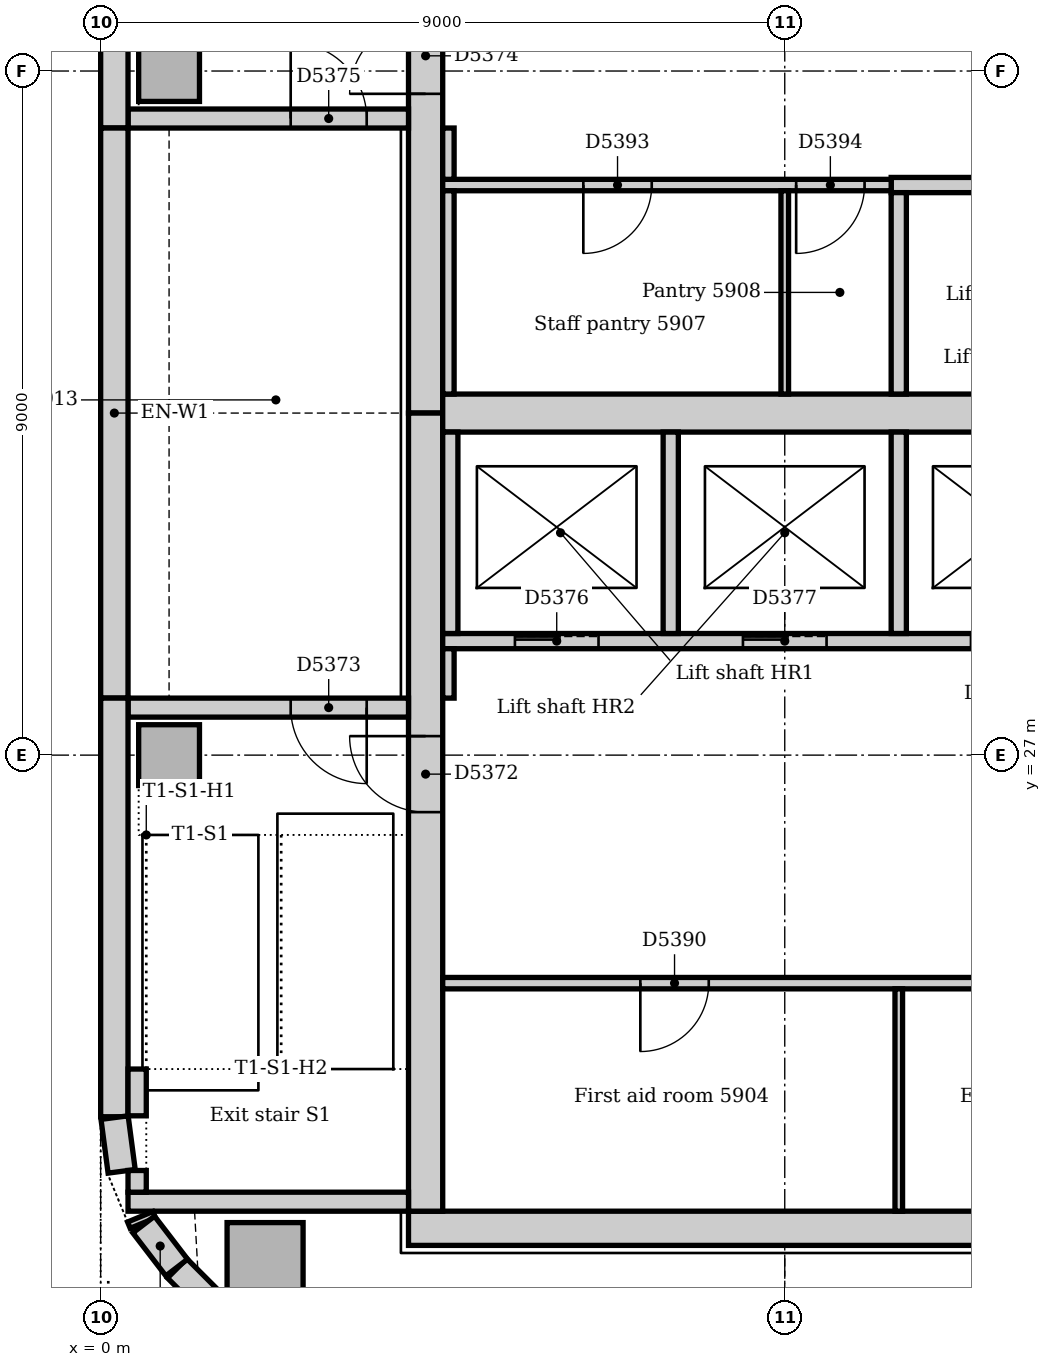
"""IFC4 building model, lengths in metres.
Left out: names, types, materials, properties, quantities, classifications, styles, units other than length and angle.
Written with IfcOpenShell. Run it as: python <this file> out.ifc"""

import sys

from ifc_helpers import new_model, si_unit, direction, frame, frame_2d, origin, origin_2d, place, context, subcontext, project, spatial, rectangle, extrude, element, fill, save


model = new_model("IFC4")
c1 = context("Model", 3, precision=1e-05, world=origin(), true_north=direction((0.0, 1.0)))
c2 = subcontext(c1, "Body", "Model", "MODEL_VIEW")
j1 = project(units=[si_unit("LENGTHUNIT", "METRE"), si_unit("PLANEANGLEUNIT", "RADIAN")], contexts=[c1])
p1 = place(None, origin())
s1 = spatial("IfcSite", under=j1, at=p1, CompositionType="ELEMENT")
p2 = place(p1, origin())
s2 = spatial("IfcBuilding", under=s1, at=p2, CompositionType="ELEMENT")
p3 = place(p2, frame((0.0, 0.0, 247.0)))
s3 = spatial("IfcBuildingStorey", under=s2, at=p3, CompositionType="ELEMENT", Elevation=247.0)
p4 = place(p3, frame((4.05, 20.775, 0.0), z_axis=(0.0, 0.0, 1.0), x_axis=(1.0, 0.0, 0.0)))
e1 = element("IfcWall", 1, at=p4, inside=s3, PredefinedType="SOLIDWALL", context=c2, shape_type="SweptSolid", body=[
    extrude(rectangle(XDim=18.9, YDim=0.45, at=frame_2d((9.45, 0.0))), origin(), (0.0, 0.0, 1.0), 4.0),
])
p5 = place(p3, frame((4.275, 42.0, 0.0), z_axis=(0.0, 0.0, 1.0), x_axis=(0.0, -1.0, 0.0)))
e2 = element("IfcWall", 2, at=p5, inside=s3, PredefinedType="SOLIDWALL", context=c2, shape_type="SweptSolid", body=[
    extrude(rectangle(XDim=10.5, YDim=0.45, at=frame_2d((5.25, 0.0))), origin(), (0.0, 0.0, 1.0), 4.0),
])
p6 = place(p5, frame((5.3, 0.0, 0.0)))
e3 = element("IfcOpeningElement", 3, at=p6, cuts=e2, PredefinedType="OPENING", context=c2, shape_type="SweptSolid", body=[
    extrude(rectangle(XDim=1.0, YDim=2.1, at=frame_2d((0.5, 1.05))), frame((0.0, 0.235, 0.0), z_axis=(0.0, -1.0, 0.0), x_axis=(1.0, 0.0, 0.0)), (0.0, 0.0, 1.0), 0.47),
])
p7 = place(p3, frame((4.275, 31.5, 0.0), z_axis=(0.0, 0.0, 1.0), x_axis=(0.0, -1.0, 0.0)))
e4 = element("IfcWall", 4, at=p7, inside=s3, PredefinedType="SOLIDWALL", context=c2, shape_type="SweptSolid", body=[
    extrude(rectangle(XDim=10.5, YDim=0.45, at=frame_2d((5.25, 0.0))), origin(), (0.0, 0.0, 1.0), 4.0),
])
p8 = place(p7, frame((4.25, 0.0, 0.0)))
e5 = element("IfcOpeningElement", 5, at=p8, cuts=e4, PredefinedType="OPENING", context=c2, shape_type="SweptSolid", body=[
    extrude(rectangle(XDim=1.0, YDim=2.1, at=frame_2d((0.5, 1.05))), frame((0.0, 0.235, 0.0), z_axis=(0.0, -1.0, 0.0), x_axis=(1.0, 0.0, 0.0)), (0.0, 0.0, 1.0), 0.47),
])
p9 = place(p3, frame((4.5, 31.5, 0.0), z_axis=(0.0, 0.0, 1.0), x_axis=(1.0, 0.0, 0.0)))
e6 = element("IfcWall", 6, at=p9, inside=s3, PredefinedType="SOLIDWALL", context=c2, shape_type="SweptSolid", body=[
    extrude(rectangle(XDim=18.0, YDim=0.5, at=frame_2d((9.0, 0.0))), origin(), (0.0, 0.0, 1.0), 4.0),
])
p10 = place(p3, frame((0.36, 21.125, 0.0), z_axis=(0.0, 0.0, 1.0), x_axis=(1.0, 0.0, 0.0)))
e7 = element("IfcWall", 7, at=p10, inside=s3, PredefinedType="SOLIDWALL", context=c2, shape_type="SweptSolid", body=[
    extrude(rectangle(XDim=3.69, YDim=0.25, at=frame_2d((1.845, 0.0))), origin(), (0.0, 0.0, 1.0), 4.0),
])
p11 = place(p3, frame((4.05, 27.625, 0.0), z_axis=(0.0, 0.0, 1.0), x_axis=(-1.0, 0.0, 0.0)))
e8 = element("IfcWall", 8, at=p11, inside=s3, PredefinedType="SOLIDWALL", context=c2, shape_type="SweptSolid", body=[
    extrude(rectangle(XDim=3.69, YDim=0.25, at=frame_2d((1.845, 0.0))), origin(), (0.0, 0.0, 1.0), 4.0),
])
p12 = place(p11, frame((0.55, 0.0, 0.0)))
e9 = element("IfcOpeningElement", 9, at=p12, cuts=e8, PredefinedType="OPENING", context=c2, shape_type="SweptSolid", body=[
    extrude(rectangle(XDim=1.0, YDim=2.1, at=frame_2d((0.5, 1.05))), frame((0.0, 0.135, 0.0), z_axis=(0.0, -1.0, 0.0), x_axis=(1.0, 0.0, 0.0)), (0.0, 0.0, 1.0), 0.27),
])
p13 = place(p3, frame((0.36, 35.375, 0.0), z_axis=(0.0, 0.0, 1.0), x_axis=(1.0, 0.0, 0.0)))
e10 = element("IfcWall", 10, at=p13, inside=s3, PredefinedType="SOLIDWALL", context=c2, shape_type="SweptSolid", body=[
    extrude(rectangle(XDim=3.69, YDim=0.25, at=frame_2d((1.845, 0.0))), origin(), (0.0, 0.0, 1.0), 4.0),
])
p14 = place(p13, frame((2.14, 0.0, 0.0)))
e11 = element("IfcOpeningElement", 11, at=p14, cuts=e10, PredefinedType="OPENING", context=c2, shape_type="SweptSolid", body=[
    extrude(rectangle(XDim=1.0, YDim=2.1, at=frame_2d((0.5, 1.05))), frame((0.0, 0.135, 0.0), z_axis=(0.0, -1.0, 0.0), x_axis=(1.0, 0.0, 0.0)), (0.0, 0.0, 1.0), 0.27),
])
p15 = place(p3, frame((2.163, 20.35, -0.15), z_axis=(0.0, 0.0, 1.0), x_axis=(1.0, 0.0, 0.0)))
e12 = element("IfcColumn", 12, at=p15, inside=s3, PredefinedType="COLUMN", context=c2, shape_type="SweptSolid", body=[
    extrude(rectangle(XDim=1.0, YDim=1.0, at=origin_2d()), origin(), (0.0, 0.0, 1.0), 4.0),
])
for number, where, z_axis, x_axis in (
    (13, (0.9, 27.0, 0.0), (0.0, 0.0, 1.0), (1.0, 0.0, 0.0)),
    (14, (0.9, 36.0, 0.0), (0.0, 0.0, 1.0), (1.0, 0.0, 0.0)),
):
    element("IfcColumn", number, at=place(p3, frame(where, z_axis=z_axis, x_axis=x_axis)), inside=s3, PredefinedType="COLUMN", context=c2, shape_type="SweptSolid", body=[
        extrude(rectangle(XDim=0.8, YDim=0.8, at=origin_2d()), origin(), (0.0, 0.0, 1.0), 4.0),
    ])
p16 = place(p3, frame((0.18, 42.0, 0.0), z_axis=(0.0, 0.0, 1.0), x_axis=(0.0, -1.0, 0.0)))
e15 = element("IfcWall", 15, at=p16, inside=s3, PredefinedType="STANDARD", context=c2, shape_type="SweptSolid", body=[
    extrude(rectangle(XDim=6.75, YDim=0.36, at=frame_2d((3.375, 0.0))), origin(), (0.0, 0.0, 1.0), 3.85),
])
p17 = place(p3, frame((0.18, 35.25, 0.0), z_axis=(0.0, 0.0, 1.0), x_axis=(0.0, -1.0, 0.0)))
e16 = element("IfcWall", 16, at=p17, inside=s3, PredefinedType="STANDARD", context=c2, shape_type="SweptSolid", body=[
    extrude(rectangle(XDim=7.5, YDim=0.36, at=frame_2d((3.75, 0.0))), origin(), (0.0, 0.0, 1.0), 3.85),
])
p18 = place(p3, frame((0.18, 27.75, 0.0), z_axis=(0.0, 0.0, 1.0), x_axis=(0.0, -1.0, 0.0)))
e17 = element("IfcWall", 17, at=p18, inside=s3, PredefinedType="STANDARD", context=c2, shape_type="SweptSolid", body=[
    extrude(rectangle(XDim=5.507, YDim=0.36, at=frame_2d((2.754, 0.0))), origin(), (0.0, 0.0, 1.0), 3.85),
])
p19 = place(p3, frame((1.006, 20.249, 0.0), z_axis=(0.0, 0.0, 1.0), x_axis=(0.707106781187, -0.707106781187, 0.0)))
e18 = element("IfcWall", 18, at=p19, inside=s3, PredefinedType="STANDARD", context=c2, shape_type="SweptSolid", body=[
    extrude(rectangle(XDim=1.757, YDim=0.36, at=frame_2d((0.879, 0.0))), origin(), (0.0, 0.0, 1.0), 3.85),
])
p20 = place(p3, frame((0.183, 22.231, 0.0), z_axis=(0.0, 0.0, 1.0), x_axis=(0.13055608231, -0.99144092581, 0.0)))
e19 = element("IfcWall", 19, at=p20, inside=s3, PredefinedType="STANDARD", context=c2, shape_type="SweptSolid", body=[
    extrude(rectangle(XDim=0.713, YDim=0.36, at=frame_2d((0.356, 0.0))), origin(), (0.0, 0.0, 1.0), 3.85),
])
p21 = place(p3, frame((0.521, 20.927, 0.0), z_axis=(0.0, 0.0, 1.0), x_axis=(0.382549378284, -0.923935048136, 0.0)))
e20 = element("IfcWall", 20, at=p21, inside=s3, PredefinedType="STANDARD", context=c2, shape_type="SweptSolid", body=[
    extrude(rectangle(XDim=0.089, YDim=0.36, at=frame_2d((0.045, 0.0))), origin(), (0.0, 0.0, 1.0), 3.85),
])
p22 = place(p3, frame((0.566, 20.825, 0.0), z_axis=(0.0, 0.0, 1.0), x_axis=(0.608802368033, -0.793321924995, 0.0)))
e21 = element("IfcWall", 21, at=p22, inside=s3, PredefinedType="STANDARD", context=c2, shape_type="SweptSolid", body=[
    extrude(rectangle(XDim=0.713, YDim=0.36, at=frame_2d((0.357, 0.0))), origin(), (0.0, 0.0, 1.0), 3.85),
])
p23 = place(p3, frame((0.48, 21.25, 0.0), z_axis=(0.0, 0.0, 1.0), x_axis=(0.0, 1.0, 0.0)))
e22 = element("IfcWall", 22, at=p23, inside=s3, PredefinedType="STANDARD", context=c2, shape_type="SweptSolid", body=[
    extrude(rectangle(XDim=0.285, YDim=0.24, at=frame_2d((0.143, 0.0))), origin(), (0.0, 0.0, 1.0), 4.0),
])
p24 = place(p3, frame((0.48, 22.255, 0.0), z_axis=(0.0, 0.0, 1.0), x_axis=(0.0, 1.0, 0.0)))
e23 = element("IfcWall", 23, at=p24, inside=s3, PredefinedType="STANDARD", context=c2, shape_type="SweptSolid", body=[
    extrude(rectangle(XDim=0.615, YDim=0.24, at=frame_2d((0.307, 0.0))), origin(), (0.0, 0.0, 1.0), 4.0),
])
p25 = place(p3, frame((4.5, 28.5, 0.0), z_axis=(0.0, 0.0, 1.0), x_axis=(1.0, 0.0, 0.0)))
e24 = element("IfcWall", 24, at=p25, inside=s3, PredefinedType="PARTITIONING", context=c2, shape_type="SweptSolid", body=[
    extrude(rectangle(XDim=18.0, YDim=0.2, at=frame_2d((9.0, 0.0))), origin(), (0.0, 0.0, 1.0), 3.85),
])
p26 = place(p25, frame((0.95, 0.0, 0.0)))
e25 = element("IfcOpeningElement", 25, at=p26, cuts=e24, PredefinedType="OPENING", context=c2, shape_type="SweptSolid", body=[
    extrude(rectangle(XDim=1.1, YDim=2.1, at=frame_2d((0.55, 1.05))), frame((0.0, 0.11, 0.0), z_axis=(0.0, -1.0, 0.0), x_axis=(1.0, 0.0, 0.0)), (0.0, 0.0, 1.0), 0.22),
])
p27 = place(p25, frame((3.95, 0.0, 0.0)))
e26 = element("IfcOpeningElement", 26, at=p27, cuts=e24, PredefinedType="OPENING", context=c2, shape_type="SweptSolid", body=[
    extrude(rectangle(XDim=1.1, YDim=2.1, at=frame_2d((0.55, 1.05))), frame((0.0, 0.11, 0.0), z_axis=(0.0, -1.0, 0.0), x_axis=(1.0, 0.0, 0.0)), (0.0, 0.0, 1.0), 0.22),
])
p28 = place(p25, frame((6.95, 0.0, 0.0)))
e27 = element("IfcOpeningElement", 27, at=p28, cuts=e24, PredefinedType="OPENING", context=c2, shape_type="SweptSolid", body=[
    extrude(rectangle(XDim=1.1, YDim=2.1, at=frame_2d((0.55, 1.05))), frame((0.0, 0.11, 0.0), z_axis=(0.0, -1.0, 0.0), x_axis=(1.0, 0.0, 0.0)), (0.0, 0.0, 1.0), 0.22),
])
p29 = place(p25, frame((9.95, 0.0, 0.0)))
e28 = element("IfcOpeningElement", 28, at=p29, cuts=e24, PredefinedType="OPENING", context=c2, shape_type="SweptSolid", body=[
    extrude(rectangle(XDim=1.1, YDim=2.1, at=frame_2d((0.55, 1.05))), frame((0.0, 0.11, 0.0), z_axis=(0.0, -1.0, 0.0), x_axis=(1.0, 0.0, 0.0)), (0.0, 0.0, 1.0), 0.22),
])
p30 = place(p25, frame((12.95, 0.0, 0.0)))
e29 = element("IfcOpeningElement", 29, at=p30, cuts=e24, PredefinedType="OPENING", context=c2, shape_type="SweptSolid", body=[
    extrude(rectangle(XDim=1.1, YDim=2.1, at=frame_2d((0.55, 1.05))), frame((0.0, 0.11, 0.0), z_axis=(0.0, -1.0, 0.0), x_axis=(1.0, 0.0, 0.0)), (0.0, 0.0, 1.0), 0.22),
])
p31 = place(p25, frame((15.95, 0.0, 0.0)))
e30 = element("IfcOpeningElement", 30, at=p31, cuts=e24, PredefinedType="OPENING", context=c2, shape_type="SweptSolid", body=[
    extrude(rectangle(XDim=1.1, YDim=2.1, at=frame_2d((0.55, 1.05))), frame((0.0, 0.11, 0.0), z_axis=(0.0, -1.0, 0.0), x_axis=(1.0, 0.0, 0.0)), (0.0, 0.0, 1.0), 0.22),
])
p32 = place(p3, frame((10.4, 34.5, 0.0), z_axis=(0.0, 0.0, 1.0), x_axis=(1.0, 0.0, 0.0)))
e31 = element("IfcWall", 31, at=p32, inside=s3, PredefinedType="PARTITIONING", context=c2, shape_type="SweptSolid", body=[
    extrude(rectangle(XDim=12.1, YDim=0.2, at=frame_2d((6.05, 0.0))), origin(), (0.0, 0.0, 1.0), 3.85),
])
p33 = place(p32, frame((7.05, 0.0, 0.0)))
e32 = element("IfcOpeningElement", 32, at=p33, cuts=e31, PredefinedType="OPENING", context=c2, shape_type="SweptSolid", body=[
    extrude(rectangle(XDim=1.1, YDim=2.1, at=frame_2d((0.55, 1.05))), frame((0.0, 0.11, 0.0), z_axis=(0.0, -1.0, 0.0), x_axis=(1.0, 0.0, 0.0)), (0.0, 0.0, 1.0), 0.22),
])
p34 = place(p32, frame((10.05, 0.0, 0.0)))
e33 = element("IfcOpeningElement", 33, at=p34, cuts=e31, PredefinedType="OPENING", context=c2, shape_type="SweptSolid", body=[
    extrude(rectangle(XDim=1.1, YDim=2.1, at=frame_2d((0.55, 1.05))), frame((0.0, 0.11, 0.0), z_axis=(0.0, -1.0, 0.0), x_axis=(1.0, 0.0, 0.0)), (0.0, 0.0, 1.0), 0.22),
])
for number, where, z_axis, x_axis in (
    (34, (10.5, 28.6, 0.0), (0.0, 0.0, 1.0), (0.0, 1.0, 0.0)),
    (35, (10.5, 31.75, 0.0), (0.0, 0.0, 1.0), (0.0, 1.0, 0.0)),
    (36, (4.6, 28.6, 0.0), (0.0, 0.0, 1.0), (0.0, 1.0, 0.0)),
    (37, (7.5, 28.6, 0.0), (0.0, 0.0, 1.0), (0.0, 1.0, 0.0)),
):
    element("IfcWall", number, at=place(p3, frame(where, z_axis=z_axis, x_axis=x_axis)), inside=s3, PredefinedType="PARTITIONING", context=c2, shape_type="SweptSolid", body=[
        extrude(rectangle(XDim=2.65, YDim=0.2, at=frame_2d((1.325, 0.0))), origin(), (0.0, 0.0, 1.0), 3.85),
    ])
p35 = place(p3, frame((4.5, 24.0, 0.0), z_axis=(0.0, 0.0, 1.0), x_axis=(1.0, 0.0, 0.0)))
e38 = element("IfcWall", 38, at=p35, inside=s3, PredefinedType="PARTITIONING", context=c2, shape_type="SweptSolid", body=[
    extrude(rectangle(XDim=18.0, YDim=0.15, at=frame_2d((9.0, 0.0))), origin(), (0.0, 0.0, 1.0), 3.85),
])
p36 = place(p35, frame((2.6, 0.0, 0.0)))
e39 = element("IfcOpeningElement", 39, at=p36, cuts=e38, PredefinedType="OPENING", context=c2, shape_type="SweptSolid", body=[
    extrude(rectangle(XDim=0.9, YDim=2.1, at=frame_2d((0.45, 1.05))), frame((0.0, 0.085, 0.0), z_axis=(0.0, -1.0, 0.0), x_axis=(1.0, 0.0, 0.0)), (0.0, 0.0, 1.0), 0.17),
])
p37 = place(p35, frame((7.8, 0.0, 0.0)))
e40 = element("IfcOpeningElement", 40, at=p37, cuts=e38, PredefinedType="OPENING", context=c2, shape_type="SweptSolid", body=[
    extrude(rectangle(XDim=0.9, YDim=2.1, at=frame_2d((0.45, 1.05))), frame((0.0, 0.085, 0.0), z_axis=(0.0, -1.0, 0.0), x_axis=(1.0, 0.0, 0.0)), (0.0, 0.0, 1.0), 0.17),
])
p38 = place(p35, frame((13.7, 0.0, 0.0)))
e41 = element("IfcOpeningElement", 41, at=p38, cuts=e38, PredefinedType="OPENING", context=c2, shape_type="SweptSolid", body=[
    extrude(rectangle(XDim=0.9, YDim=2.1, at=frame_2d((0.45, 1.05))), frame((0.0, 0.085, 0.0), z_axis=(0.0, -1.0, 0.0), x_axis=(1.0, 0.0, 0.0)), (0.0, 0.0, 1.0), 0.17),
])
p39 = place(p3, frame((4.5, 34.5, 0.0), z_axis=(0.0, 0.0, 1.0), x_axis=(1.0, 0.0, 0.0)))
e42 = element("IfcWall", 42, at=p39, inside=s3, PredefinedType="PARTITIONING", context=c2, shape_type="SweptSolid", body=[
    extrude(rectangle(XDim=5.9, YDim=0.15, at=frame_2d((2.95, 0.0))), origin(), (0.0, 0.0, 1.0), 3.85),
])
p40 = place(p39, frame((1.85, 0.0, 0.0)))
e43 = element("IfcOpeningElement", 43, at=p40, cuts=e42, PredefinedType="OPENING", context=c2, shape_type="SweptSolid", body=[
    extrude(rectangle(XDim=0.9, YDim=2.1, at=frame_2d((0.45, 1.05))), frame((0.0, 0.085, 0.0), z_axis=(0.0, -1.0, 0.0), x_axis=(1.0, 0.0, 0.0)), (0.0, 0.0, 1.0), 0.17),
])
p41 = place(p39, frame((4.65, 0.0, 0.0)))
e44 = element("IfcOpeningElement", 44, at=p41, cuts=e42, PredefinedType="OPENING", context=c2, shape_type="SweptSolid", body=[
    extrude(rectangle(XDim=0.9, YDim=2.1, at=frame_2d((0.45, 1.05))), frame((0.0, 0.085, 0.0), z_axis=(0.0, -1.0, 0.0), x_axis=(1.0, 0.0, 0.0)), (0.0, 0.0, 1.0), 0.17),
])
p42 = place(p3, frame((4.575, 34.575, 0.0), z_axis=(0.0, 0.0, 1.0), x_axis=(0.0, 1.0, 0.0)))
e45 = element("IfcWall", 45, at=p42, inside=s3, PredefinedType="PARTITIONING", context=c2, shape_type="SweptSolid", body=[
    extrude(rectangle(XDim=0.675, YDim=0.15, at=frame_2d((0.338, 0.0))), origin(), (0.0, 0.0, 1.0), 3.85),
])
p43 = place(p3, frame((4.575, 31.75, 0.0), z_axis=(0.0, 0.0, 1.0), x_axis=(0.0, 1.0, 0.0)))
e46 = element("IfcWall", 46, at=p43, inside=s3, PredefinedType="PARTITIONING", context=c2, shape_type="SweptSolid", body=[
    extrude(rectangle(XDim=2.675, YDim=0.15, at=frame_2d((1.337, 0.0))), origin(), (0.0, 0.0, 1.0), 3.85),
])
p44 = place(p3, frame((4.575, 27.75, 0.0), z_axis=(0.0, 0.0, 1.0), x_axis=(0.0, 1.0, 0.0)))
e47 = element("IfcWall", 47, at=p44, inside=s3, PredefinedType="PARTITIONING", context=c2, shape_type="SweptSolid", body=[
    extrude(rectangle(XDim=0.65, YDim=0.15, at=frame_2d((0.325, 0.0))), origin(), (0.0, 0.0, 1.0), 3.85),
])
p45 = place(p3, frame((9.0, 31.75, 0.0), z_axis=(0.0, 0.0, 1.0), x_axis=(0.0, 1.0, 0.0)))
e48 = element("IfcWall", 48, at=p45, inside=s3, PredefinedType="PARTITIONING", context=c2, shape_type="SweptSolid", body=[
    extrude(rectangle(XDim=2.675, YDim=0.1, at=frame_2d((1.337, 0.0))), origin(), (0.0, 0.0, 1.0), 3.85),
])
p46 = place(p3, frame((10.5, 21.0, 0.0), z_axis=(0.0, 0.0, 1.0), x_axis=(0.0, 1.0, 0.0)))
e49 = element("IfcWall", 49, at=p46, inside=s3, PredefinedType="PARTITIONING", context=c2, shape_type="SweptSolid", body=[
    extrude(rectangle(XDim=2.925, YDim=0.1, at=frame_2d((1.462, 0.0))), origin(), (0.0, 0.0, 1.0), 3.85),
])
p47 = place(p8, frame((1.0, 0.0, 0.0), z_axis=(0.0, 0.0, 1.0), x_axis=(-1.0, 0.0, 0.0)))
e50 = element("IfcDoor", 50, at=p47, inside=s3, OperationType="SINGLE_SWING_RIGHT", PredefinedType="DOOR", context=c2, shape_type="SweptSolid", body=[
    extrude(rectangle(XDim=1.0, YDim=2.1, at=frame_2d((0.5, 1.05))), frame((0.0, 0.025, 0.0), z_axis=(0.0, -1.0, 0.0), x_axis=(1.0, 0.0, 0.0)), (0.0, 0.0, 1.0), 0.05),
])
fill(e5, e50)
p48 = place(p12, origin())
e51 = element("IfcDoor", 51, at=p48, inside=s3, OperationType="SINGLE_SWING_LEFT", PredefinedType="DOOR", context=c2, shape_type="SweptSolid", body=[
    extrude(rectangle(XDim=1.0, YDim=2.1, at=frame_2d((0.5, 1.05))), frame((0.0, 0.025, 0.0), z_axis=(0.0, -1.0, 0.0), x_axis=(1.0, 0.0, 0.0)), (0.0, 0.0, 1.0), 0.05),
])
fill(e9, e51)
p49 = place(p6, frame((1.0, 0.0, 0.0), z_axis=(0.0, 0.0, 1.0), x_axis=(-1.0, 0.0, 0.0)))
e52 = element("IfcDoor", 52, at=p49, inside=s3, OperationType="SINGLE_SWING_LEFT", PredefinedType="DOOR", context=c2, shape_type="SweptSolid", body=[
    extrude(rectangle(XDim=1.0, YDim=2.1, at=frame_2d((0.5, 1.05))), frame((0.0, 0.025, 0.0), z_axis=(0.0, -1.0, 0.0), x_axis=(1.0, 0.0, 0.0)), (0.0, 0.0, 1.0), 0.05),
])
fill(e3, e52)
p50 = place(p14, origin())
e53 = element("IfcDoor", 53, at=p50, inside=s3, OperationType="SINGLE_SWING_LEFT", PredefinedType="DOOR", context=c2, shape_type="SweptSolid", body=[
    extrude(rectangle(XDim=1.0, YDim=2.1, at=frame_2d((0.5, 1.05))), frame((0.0, 0.025, 0.0), z_axis=(0.0, -1.0, 0.0), x_axis=(1.0, 0.0, 0.0)), (0.0, 0.0, 1.0), 0.05),
])
fill(e11, e53)
p51 = place(p26, origin())
e54 = element("IfcDoor", 54, at=p51, inside=s3, OperationType="SLIDING_TO_LEFT", PredefinedType="DOOR", context=c2, shape_type="SweptSolid", body=[
    extrude(rectangle(XDim=1.1, YDim=2.1, at=frame_2d((0.55, 1.05))), frame((0.0, 0.025, 0.0), z_axis=(0.0, -1.0, 0.0), x_axis=(1.0, 0.0, 0.0)), (0.0, 0.0, 1.0), 0.05),
])
fill(e25, e54)
p52 = place(p27, origin())
e55 = element("IfcDoor", 55, at=p52, inside=s3, OperationType="SLIDING_TO_LEFT", PredefinedType="DOOR", context=c2, shape_type="SweptSolid", body=[
    extrude(rectangle(XDim=1.1, YDim=2.1, at=frame_2d((0.55, 1.05))), frame((0.0, 0.025, 0.0), z_axis=(0.0, -1.0, 0.0), x_axis=(1.0, 0.0, 0.0)), (0.0, 0.0, 1.0), 0.05),
])
fill(e26, e55)
p53 = place(p36, frame((0.9, 0.0, 0.0), z_axis=(0.0, 0.0, 1.0), x_axis=(-1.0, 0.0, 0.0)))
e56 = element("IfcDoor", 56, at=p53, inside=s3, OperationType="SINGLE_SWING_RIGHT", PredefinedType="DOOR", context=c2, shape_type="SweptSolid", body=[
    extrude(rectangle(XDim=0.9, YDim=2.1, at=frame_2d((0.45, 1.05))), frame((0.0, 0.025, 0.0), z_axis=(0.0, -1.0, 0.0), x_axis=(1.0, 0.0, 0.0)), (0.0, 0.0, 1.0), 0.05),
])
fill(e39, e56)
p54 = place(p40, frame((0.9, 0.0, 0.0), z_axis=(0.0, 0.0, 1.0), x_axis=(-1.0, 0.0, 0.0)))
e57 = element("IfcDoor", 57, at=p54, inside=s3, OperationType="SINGLE_SWING_RIGHT", PredefinedType="DOOR", context=c2, shape_type="SweptSolid", body=[
    extrude(rectangle(XDim=0.9, YDim=2.1, at=frame_2d((0.45, 1.05))), frame((0.0, 0.025, 0.0), z_axis=(0.0, -1.0, 0.0), x_axis=(1.0, 0.0, 0.0)), (0.0, 0.0, 1.0), 0.05),
])
fill(e43, e57)
p55 = place(p41, frame((0.9, 0.0, 0.0), z_axis=(0.0, 0.0, 1.0), x_axis=(-1.0, 0.0, 0.0)))
e58 = element("IfcDoor", 58, at=p55, inside=s3, OperationType="SINGLE_SWING_RIGHT", PredefinedType="DOOR", context=c2, shape_type="SweptSolid", body=[
    extrude(rectangle(XDim=0.9, YDim=2.1, at=frame_2d((0.45, 1.05))), frame((0.0, 0.025, 0.0), z_axis=(0.0, -1.0, 0.0), x_axis=(1.0, 0.0, 0.0)), (0.0, 0.0, 1.0), 0.05),
])
fill(e44, e58)
save(model, sys.argv[1])
